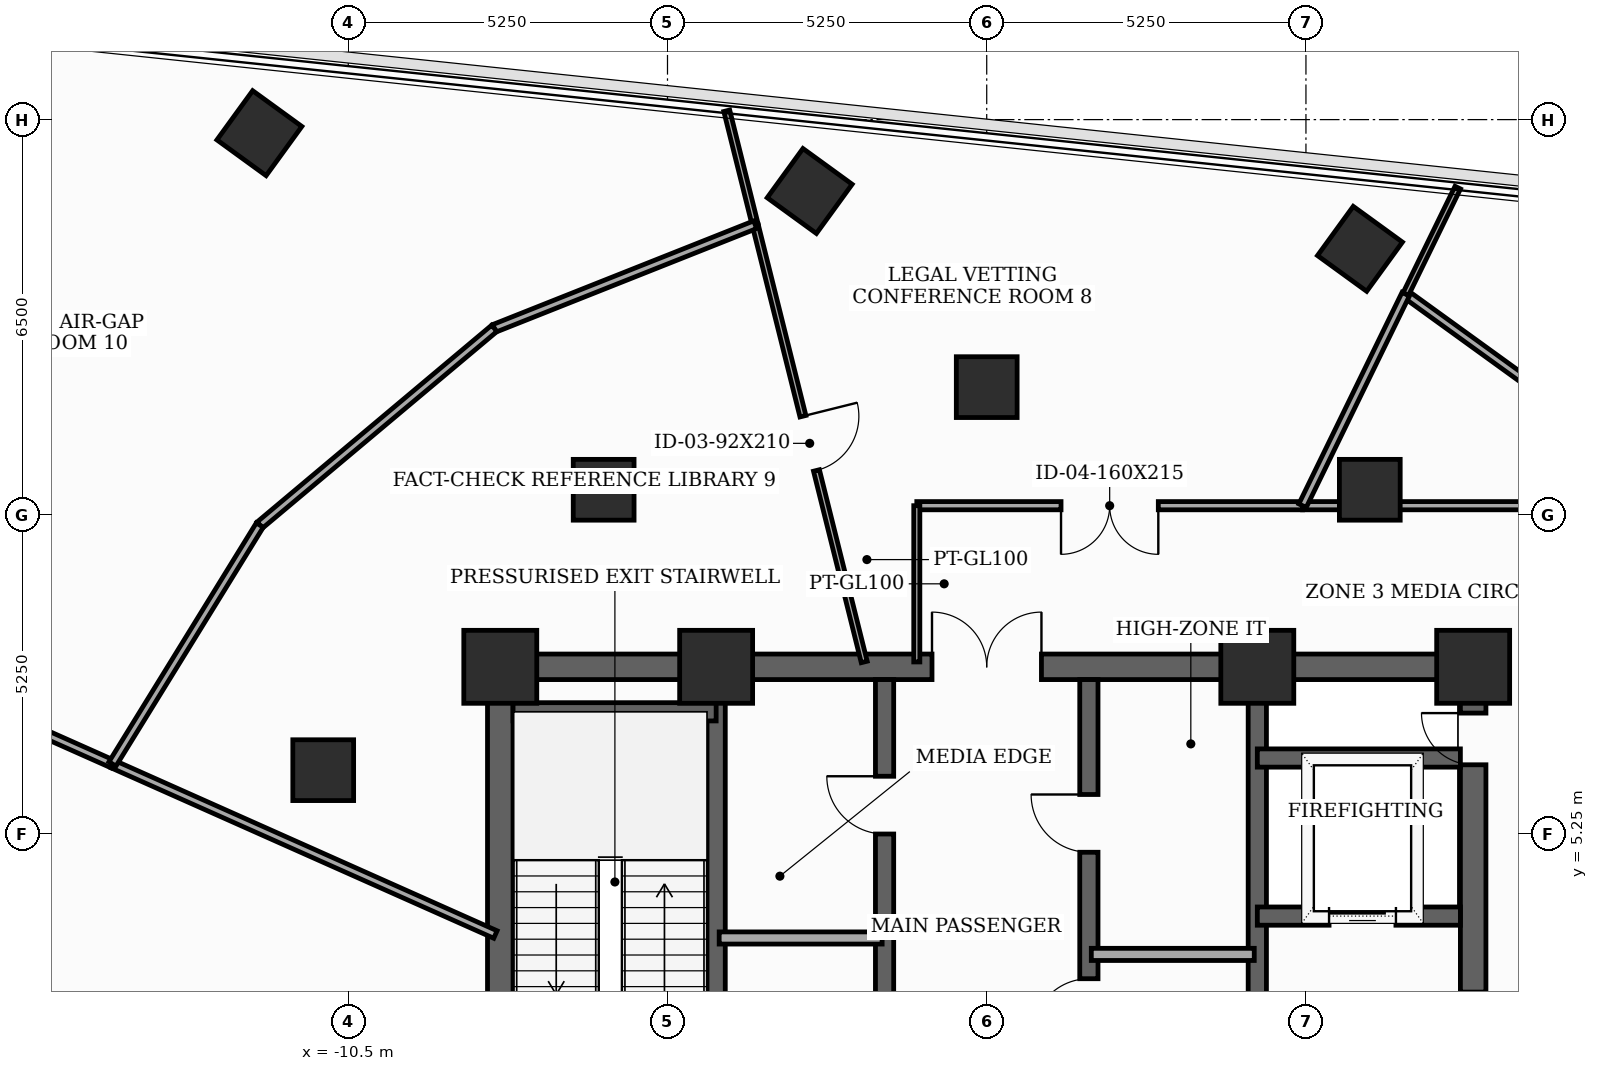
"""IFC4 building model, lengths in metres.
Left out: names, types, materials, properties, quantities, classifications, styles, units other than length and angle.
Written with IfcOpenShell. Run it as: python <this file> out.ifc"""

import sys

from ifc_helpers import new_model, si_unit, direction, frame, frame_2d, origin, origin_2d, place, context, subcontext, project, spatial, rectangle, extrude, element, fill, save


model = new_model("IFC4")
c1 = context("Model", 3, precision=1e-05, world=origin(), true_north=direction((0.0, 1.0)))
c2 = subcontext(c1, "Body", "Model", "MODEL_VIEW")
j1 = project(units=[si_unit("LENGTHUNIT", "METRE"), si_unit("PLANEANGLEUNIT", "RADIAN")], contexts=[c1])
p1 = place(None, origin())
s1 = spatial("IfcSite", under=j1, at=p1, CompositionType="ELEMENT")
p2 = place(p1, origin())
s2 = spatial("IfcBuilding", under=s1, at=p2, CompositionType="ELEMENT")
p3 = place(p2, frame((0.0, 0.0, 230.0)))
s3 = spatial("IfcBuildingStorey", under=s2, at=p3, CompositionType="ELEMENT", Elevation=230.0)
for number, where, z_axis, x_axis in (
    (1, (8.0, 8.0, 0.0), (0.0, 0.0, 1.0), (1.0, 0.0, 0.0)),
    (2, (4.45, 8.0, 0.0), (0.0, 0.0, 1.0), (1.0, 0.0, 0.0)),
    (3, (-4.45, 8.0, 0.0), (0.0, 0.0, 1.0), (1.0, 0.0, 0.0)),
    (4, (-8.0, 8.0, 0.0), (0.0, 0.0, 1.0), (1.0, 0.0, 0.0)),
):
    element("IfcColumn", number, at=place(p3, frame(where, z_axis=z_axis, x_axis=x_axis)), inside=s3, PredefinedType="COLUMN", context=c2, shape_type="SweptSolid", body=[
        extrude(rectangle(XDim=1.2, YDim=1.2, at=origin_2d()), origin(), (0.0, 0.0, 1.0), 3.7),
    ])
for number, where, z_axis, x_axis in (
    (5, (6.3, 10.912, 0.0), (0.0, 0.0, 1.0), (1.0, 0.0, 0.0)),
    (6, (0.0, 12.6, 0.0), (0.0, 0.0, 1.0), (1.0, 0.0, 0.0)),
    (7, (-6.3, 10.912, 0.0), (0.0, 0.0, 1.0), (1.0, 0.0, 0.0)),
    (8, (-10.912, 6.3, 0.0), (0.0, 0.0, 1.0), (1.0, 0.0, 0.0)),
    (9, (6.138, 14.875, 0.0), (0.0, 0.0, 1.0), (0.588, 0.809, 0.0)),
    (10, (-2.912, 15.826, 0.0), (0.0, 0.0, 1.0), (0.588, 0.809, 0.0)),
    (11, (-11.962, 16.777, 0.0), (0.0, 0.0, 1.0), (0.588, 0.809, 0.0)),
):
    element("IfcColumn", number, at=place(p3, frame(where, z_axis=z_axis, x_axis=x_axis)), inside=s3, PredefinedType="COLUMN", context=c2, shape_type="SweptSolid", body=[
        extrude(rectangle(XDim=1.0, YDim=1.0, at=origin_2d()), origin(), (0.0, 0.0, 1.0), 3.7),
    ])
p4 = place(p3, frame((-8.0, -8.0, 0.0), z_axis=(0.0, 0.0, 1.0), x_axis=(0.0, 1.0, 0.0)))
e12 = element("IfcWall", 12, at=p4, inside=s3, PredefinedType="SHEAR", context=c2, shape_type="SweptSolid", body=[
    extrude(rectangle(XDim=16.0, YDim=0.42, at=frame_2d((8.0, 0.0))), origin(), (0.0, 0.0, 1.0), 3.5),
])
p5 = place(p4, frame((0.761, 0.0, 0.0)))
e13 = element("IfcOpeningElement", 13, at=p5, cuts=e12, PredefinedType="OPENING", context=c2, shape_type="SweptSolid", body=[
    extrude(rectangle(XDim=0.85, YDim=2.02, at=frame_2d((0.425, 1.01))), frame((0.0, 0.22, 0.0), z_axis=(0.0, -1.0, 0.0), x_axis=(1.0, 0.0, 0.0)), (0.0, 0.0, 1.0), 0.44),
])
p6 = place(p4, frame((5.35, 0.0, 0.0)))
e14 = element("IfcOpeningElement", 14, at=p6, cuts=e12, PredefinedType="OPENING", context=c2, shape_type="SweptSolid", body=[
    extrude(rectangle(XDim=1.05, YDim=2.15, at=frame_2d((0.525, 1.075))), frame((0.0, 0.22, 0.0), z_axis=(0.0, -1.0, 0.0), x_axis=(1.0, 0.0, 0.0)), (0.0, 0.0, 1.0), 0.44),
])
p7 = place(p3, frame((8.0, -8.0, 0.0), z_axis=(0.0, 0.0, 1.0), x_axis=(0.0, 1.0, 0.0)))
e15 = element("IfcWall", 15, at=p7, inside=s3, PredefinedType="SHEAR", context=c2, shape_type="SweptSolid", body=[
    extrude(rectangle(XDim=16.0, YDim=0.42, at=frame_2d((8.0, 0.0))), origin(), (0.0, 0.0, 1.0), 3.5),
])
p8 = place(p7, frame((9.6, 0.0, 0.0)))
e16 = element("IfcOpeningElement", 16, at=p8, cuts=e15, PredefinedType="OPENING", context=c2, shape_type="SweptSolid", body=[
    extrude(rectangle(XDim=1.05, YDim=2.15, at=frame_2d((0.525, 1.075))), frame((0.0, 0.22, 0.0), z_axis=(0.0, -1.0, 0.0), x_axis=(1.0, 0.0, 0.0)), (0.0, 0.0, 1.0), 0.44),
])
p9 = place(p7, frame((14.389, 0.0, 0.0)))
e17 = element("IfcOpeningElement", 17, at=p9, cuts=e15, PredefinedType="OPENING", context=c2, shape_type="SweptSolid", body=[
    extrude(rectangle(XDim=0.85, YDim=2.02, at=frame_2d((0.425, 1.01))), frame((0.0, 0.22, 0.0), z_axis=(0.0, -1.0, 0.0), x_axis=(1.0, 0.0, 0.0)), (0.0, 0.0, 1.0), 0.44),
])
p10 = place(p3, frame((-8.0, 8.0, 0.0), z_axis=(0.0, 0.0, 1.0), x_axis=(1.0, 0.0, 0.0)))
e18 = element("IfcWall", 18, at=p10, inside=s3, PredefinedType="SHEAR", context=c2, shape_type="SweptSolid", body=[
    extrude(rectangle(XDim=16.0, YDim=0.42, at=frame_2d((8.0, 0.0))), origin(), (0.0, 0.0, 1.0), 3.5),
])
p11 = place(p10, frame((7.1, 0.0, 0.0)))
e19 = element("IfcOpeningElement", 19, at=p11, cuts=e18, PredefinedType="OPENING", context=c2, shape_type="SweptSolid", body=[
    extrude(rectangle(XDim=1.8, YDim=2.15, at=frame_2d((0.9, 1.075))), frame((0.0, 0.22, 0.0), z_axis=(0.0, -1.0, 0.0), x_axis=(1.0, 0.0, 0.0)), (0.0, 0.0, 1.0), 0.44),
])
for number, where, z_axis, x_axis in (
    (20, (-4.45, -7.79, 0.0), (0.0, 0.0, 1.0), (0.0, 1.0, 0.0)),
    (21, (4.45, -7.79, 0.0), (0.0, 0.0, 1.0), (0.0, 1.0, 0.0)),
):
    element("IfcWall", number, at=place(p3, frame(where, z_axis=z_axis, x_axis=x_axis)), inside=s3, PredefinedType="SHEAR", context=c2, shape_type="SweptSolid", body=[
        extrude(rectangle(XDim=15.58, YDim=0.3, at=frame_2d((7.79, 0.0))), origin(), (0.0, 0.0, 1.0), 3.5),
    ])
p12 = place(p3, frame((-7.79, 7.26, 0.0), z_axis=(0.0, 0.0, 1.0), x_axis=(1.0, 0.0, 0.0)))
e22 = element("IfcWall", 22, at=p12, inside=s3, PredefinedType="SHEAR", context=c2, shape_type="SweptSolid", body=[
    extrude(rectangle(XDim=3.34, YDim=0.3, at=frame_2d((1.67, 0.0))), origin(), (0.0, 0.0, 1.0), 3.5),
])
p13 = place(p3, frame((4.45, 3.9, 0.0), z_axis=(0.0, 0.0, 1.0), x_axis=(1.0, 0.0, 0.0)))
e23 = element("IfcWall", 23, at=p13, inside=s3, PredefinedType="SHEAR", context=c2, shape_type="SweptSolid", body=[
    extrude(rectangle(XDim=3.34, YDim=0.3, at=frame_2d((1.67, 0.0))), origin(), (0.0, 0.0, 1.0), 3.5),
])
p14 = place(p13, frame((1.18, 0.0, 0.0)))
e24 = element("IfcOpeningElement", 24, at=p14, cuts=e23, PredefinedType="OPENING", context=c2, shape_type="SweptSolid", body=[
    extrude(rectangle(XDim=1.1, YDim=2.1, at=frame_2d((0.55, 1.05))), frame((0.0, 0.16, 0.0), z_axis=(0.0, -1.0, 0.0), x_axis=(1.0, 0.0, 0.0)), (0.0, 0.0, 1.0), 0.32),
])
p15 = place(p3, frame((4.45, 6.5, 0.0), z_axis=(0.0, 0.0, 1.0), x_axis=(1.0, 0.0, 0.0)))
e25 = element("IfcWall", 25, at=p15, inside=s3, PredefinedType="SHEAR", context=c2, shape_type="SweptSolid", body=[
    extrude(rectangle(XDim=3.34, YDim=0.3, at=frame_2d((1.67, 0.0))), origin(), (0.0, 0.0, 1.0), 3.5),
])
p16 = place(p3, frame((-1.68, -4.85, 0.0), z_axis=(0.0, 0.0, 1.0), x_axis=(0.0, 1.0, 0.0)))
e26 = element("IfcWall", 26, at=p16, inside=s3, PredefinedType="SHEAR", context=c2, shape_type="SweptSolid", body=[
    extrude(rectangle(XDim=12.64, YDim=0.3, at=frame_2d((6.32, 0.0))), origin(), (0.0, 0.0, 1.0), 3.5),
])
p17 = place(p16, frame((1.65, 0.0, 0.0)))
e27 = element("IfcOpeningElement", 27, at=p17, cuts=e26, PredefinedType="OPENING", context=c2, shape_type="SweptSolid", body=[
    extrude(rectangle(XDim=0.95, YDim=2.1, at=frame_2d((0.475, 1.05))), frame((0.0, 0.16, 0.0), z_axis=(0.0, -1.0, 0.0), x_axis=(1.0, 0.0, 0.0)), (0.0, 0.0, 1.0), 0.32),
])
p18 = place(p16, frame((5.9, 0.0, 0.0)))
e28 = element("IfcOpeningElement", 28, at=p18, cuts=e26, PredefinedType="OPENING", context=c2, shape_type="SweptSolid", body=[
    extrude(rectangle(XDim=0.95, YDim=2.1, at=frame_2d((0.475, 1.05))), frame((0.0, 0.16, 0.0), z_axis=(0.0, -1.0, 0.0), x_axis=(1.0, 0.0, 0.0)), (0.0, 0.0, 1.0), 0.32),
])
p19 = place(p16, frame((10.1, 0.0, 0.0)))
e29 = element("IfcOpeningElement", 29, at=p19, cuts=e26, PredefinedType="OPENING", context=c2, shape_type="SweptSolid", body=[
    extrude(rectangle(XDim=0.95, YDim=2.1, at=frame_2d((0.475, 1.05))), frame((0.0, 0.16, 0.0), z_axis=(0.0, -1.0, 0.0), x_axis=(1.0, 0.0, 0.0)), (0.0, 0.0, 1.0), 0.32),
])
p20 = place(p3, frame((1.68, -4.85, 0.0), z_axis=(0.0, 0.0, 1.0), x_axis=(0.0, 1.0, 0.0)))
e30 = element("IfcWall", 30, at=p20, inside=s3, PredefinedType="SHEAR", context=c2, shape_type="SweptSolid", body=[
    extrude(rectangle(XDim=12.64, YDim=0.3, at=frame_2d((6.32, 0.0))), origin(), (0.0, 0.0, 1.0), 3.5),
])
p21 = place(p20, frame((0.55, 0.0, 0.0)))
e31 = element("IfcOpeningElement", 31, at=p21, cuts=e30, PredefinedType="OPENING", context=c2, shape_type="SweptSolid", body=[
    extrude(rectangle(XDim=1.1, YDim=2.1, at=frame_2d((0.55, 1.05))), frame((0.0, 0.16, 0.0), z_axis=(0.0, -1.0, 0.0), x_axis=(1.0, 0.0, 0.0)), (0.0, 0.0, 1.0), 0.32),
])
p22 = place(p20, frame((2.65, 0.0, 0.0)))
e32 = element("IfcOpeningElement", 32, at=p22, cuts=e30, PredefinedType="OPENING", context=c2, shape_type="SweptSolid", body=[
    extrude(rectangle(XDim=1.1, YDim=2.1, at=frame_2d((0.55, 1.05))), frame((0.0, 0.16, 0.0), z_axis=(0.0, -1.0, 0.0), x_axis=(1.0, 0.0, 0.0)), (0.0, 0.0, 1.0), 0.32),
])
p23 = place(p20, frame((4.75, 0.0, 0.0)))
e33 = element("IfcOpeningElement", 33, at=p23, cuts=e30, PredefinedType="OPENING", context=c2, shape_type="SweptSolid", body=[
    extrude(rectangle(XDim=1.1, YDim=2.1, at=frame_2d((0.55, 1.05))), frame((0.0, 0.16, 0.0), z_axis=(0.0, -1.0, 0.0), x_axis=(1.0, 0.0, 0.0)), (0.0, 0.0, 1.0), 0.32),
])
p24 = place(p20, frame((6.8, 0.0, 0.0)))
e34 = element("IfcOpeningElement", 34, at=p24, cuts=e30, PredefinedType="OPENING", context=c2, shape_type="SweptSolid", body=[
    extrude(rectangle(XDim=0.92, YDim=2.1, at=frame_2d((0.46, 1.05))), frame((0.0, 0.16, 0.0), z_axis=(0.0, -1.0, 0.0), x_axis=(1.0, 0.0, 0.0)), (0.0, 0.0, 1.0), 0.32),
])
p25 = place(p20, frame((9.8, 0.0, 0.0)))
e35 = element("IfcOpeningElement", 35, at=p25, cuts=e30, PredefinedType="OPENING", context=c2, shape_type="SweptSolid", body=[
    extrude(rectangle(XDim=0.95, YDim=2.1, at=frame_2d((0.475, 1.05))), frame((0.0, 0.16, 0.0), z_axis=(0.0, -1.0, 0.0), x_axis=(1.0, 0.0, 0.0)), (0.0, 0.0, 1.0), 0.32),
])
for number, where, z_axis, x_axis in (
    (36, (-4.4, 3.54, 0.0), (0.0, 0.0, 1.0), (1.0, 0.0, 0.0)),
    (37, (1.72, 3.27, 0.0), (0.0, 0.0, 1.0), (1.0, 0.0, 0.0)),
):
    element("IfcWall", number, at=place(p3, frame(where, z_axis=z_axis, x_axis=x_axis)), inside=s3, PredefinedType="SOLIDWALL", context=c2, shape_type="SweptSolid", body=[
        extrude(rectangle(XDim=2.68, YDim=0.2, at=frame_2d((1.34, 0.0))), origin(), (0.0, 0.0, 1.0), 3.5),
    ])
p26 = place(p3, frame((10.15, 10.65, 0.0), z_axis=(0.0, 0.0, 1.0), x_axis=(-1.0, 0.0, 0.0)))
e38 = element("IfcWall", 38, at=p26, inside=s3, PredefinedType="PARTITIONING", context=c2, shape_type="SweptSolid", body=[
    extrude(rectangle(XDim=4.956, YDim=0.135, at=frame_2d((2.478, 0.0))), origin(), (0.0, 0.0, 1.0), 2.885),
])
p27 = place(p3, frame((5.194, 10.65, 0.0), z_axis=(0.0, 0.0, 1.0), x_axis=(-1.0, 0.0, 0.0)))
e39 = element("IfcWall", 39, at=p27, inside=s3, PredefinedType="PARTITIONING", context=c2, shape_type="SweptSolid", body=[
    extrude(rectangle(XDim=6.344, YDim=0.135, at=frame_2d((3.172, 0.0))), origin(), (0.0, 0.0, 1.0), 2.885),
])
p28 = place(p27, frame((2.372, 0.0, 0.0)))
e40 = element("IfcOpeningElement", 40, at=p28, cuts=e39, PredefinedType="OPENING", context=c2, shape_type="SweptSolid", body=[
    extrude(rectangle(XDim=1.6, YDim=2.15, at=frame_2d((0.8, 1.075))), frame((0.0, 0.077, 0.0), z_axis=(0.0, -1.0, 0.0), x_axis=(1.0, 0.0, 0.0)), (0.0, 0.0, 1.0), 0.155),
])
p29 = place(p3, frame((-1.15, 10.65, 0.0), z_axis=(0.0, 0.0, 1.0), x_axis=(0.0, -1.0, 0.0)))
e41 = element("IfcWall", 41, at=p29, inside=s3, PredefinedType="MOVABLE", context=c2, shape_type="SweptSolid", body=[
    extrude(rectangle(XDim=2.57, YDim=0.1, at=frame_2d((1.285, 0.0))), origin(), (0.0, 0.0, 1.0), 2.885),
])
p30 = place(p3, frame((-8.08, 3.597, 0.0), z_axis=(0.0, 0.0, 1.0), x_axis=(-0.913494385598, 0.40685133339, 0.0)))
e42 = element("IfcWall", 42, at=p30, inside=s3, PredefinedType="PARTITIONING", context=c2, shape_type="SweptSolid", body=[
    extrude(rectangle(XDim=6.894, YDim=0.135, at=frame_2d((3.447, 0.0))), origin(), (0.0, 0.0, 1.0), 2.885),
])
p31 = place(p3, frame((-14.378, 6.402, 0.0), z_axis=(0.0, 0.0, 1.0), x_axis=(-0.913562917951, 0.406697424315, 0.0)))
e43 = element("IfcWall", 43, at=p31, inside=s3, PredefinedType="PARTITIONING", context=c2, shape_type="SweptSolid", body=[
    extrude(rectangle(XDim=9.077, YDim=0.135, at=frame_2d((4.538, 0.0))), origin(), (0.0, 0.0, 1.0), 2.985),
])
p32 = place(p31, frame((4.078, 0.0, 0.0)))
e44 = element("IfcOpeningElement", 44, at=p32, cuts=e43, PredefinedType="OPENING", context=c2, shape_type="SweptSolid", body=[
    extrude(rectangle(XDim=0.92, YDim=2.1, at=frame_2d((0.46, 1.05))), frame((0.0, 0.077, 0.0), z_axis=(0.0, -1.0, 0.0), x_axis=(1.0, 0.0, 0.0)), (0.0, 0.0, 1.0), 0.155),
])
p33 = place(p3, frame((11.602, 10.725, 0.0), z_axis=(0.0, 0.0, 1.0), x_axis=(-0.810322435649, 0.58598425771, 0.0)))
e45 = element("IfcWall", 45, at=p33, inside=s3, PredefinedType="PARTITIONING", context=c2, shape_type="SweptSolid", body=[
    extrude(rectangle(XDim=5.812, YDim=0.135, at=frame_2d((2.906, 0.0))), origin(), (0.0, 0.0, 1.0), 3.5),
])
p34 = place(p3, frame((6.892, 14.131, 0.0), z_axis=(0.0, 0.0, 1.0), x_axis=(-0.438392584888, -0.898783589923, 0.0)))
e46 = element("IfcWall", 46, at=p34, inside=s3, PredefinedType="PARTITIONING", context=c2, shape_type="SweptSolid", body=[
    extrude(rectangle(XDim=3.873, YDim=0.135, at=frame_2d((1.937, 0.0))), origin(), (0.0, 0.0, 1.0), 2.885),
])
p35 = place(p3, frame((7.747, 15.882, 0.0), z_axis=(0.0, 0.0, 1.0), x_axis=(-0.438571753549, -0.898696176129, 0.0)))
e47 = element("IfcWall", 47, at=p35, inside=s3, PredefinedType="MOVABLE", context=c2, shape_type="SweptSolid", body=[
    extrude(rectangle(XDim=1.948, YDim=0.1, at=frame_2d((0.974, 0.0))), origin(), (0.0, 0.0, 1.0), 3.035),
])
p36 = place(p3, frame((-3.808, 15.271, 0.0), z_axis=(0.0, 0.0, 1.0), x_axis=(0.241993010569, -0.970277992555, 0.0)))
e48 = element("IfcWall", 48, at=p36, inside=s3, PredefinedType="MOVABLE", context=c2, shape_type="SweptSolid", body=[
    extrude(rectangle(XDim=7.411, YDim=0.1, at=frame_2d((3.706, 0.0))), origin(), (0.0, 0.0, 1.0), 2.885),
])
p37 = place(p36, frame((3.246, 0.0, 0.0)))
e49 = element("IfcOpeningElement", 49, at=p37, cuts=e48, PredefinedType="OPENING", context=c2, shape_type="SweptSolid", body=[
    extrude(rectangle(XDim=0.92, YDim=2.1, at=frame_2d((0.46, 1.05))), frame((0.0, 0.06, 0.0), z_axis=(0.0, -1.0, 0.0), x_axis=(1.0, 0.0, 0.0)), (0.0, 0.0, 1.0), 0.12),
])
p38 = place(p3, frame((-4.275, 17.146, 0.0), z_axis=(0.0, 0.0, 1.0), x_axis=(0.241881394388, -0.970305823464, 0.0)))
e50 = element("IfcWall", 50, at=p38, inside=s3, PredefinedType="MOVABLE", context=c2, shape_type="SweptSolid", body=[
    extrude(rectangle(XDim=1.932, YDim=0.1, at=frame_2d((0.966, 0.0))), origin(), (0.0, 0.0, 1.0), 3.035),
])
p39 = place(p3, frame((-3.808, 15.271, 0.0), z_axis=(0.0, 0.0, 1.0), x_axis=(-0.929356809345, -0.369182774414, 0.0)))
e51 = element("IfcWall", 51, at=p39, inside=s3, PredefinedType="PARTITIONING", context=c2, shape_type="SweptSolid", body=[
    extrude(rectangle(XDim=4.616, YDim=0.135, at=frame_2d((2.308, 0.0))), origin(), (0.0, 0.0, 1.0), 3.5),
])
p40 = place(p3, frame((-8.098, 13.567, 0.0), z_axis=(0.0, 0.0, 1.0), x_axis=(-0.766114520239, -0.642704085781, 0.0)))
e52 = element("IfcWall", 52, at=p40, inside=s3, PredefinedType="PARTITIONING", context=c2, shape_type="SweptSolid", body=[
    extrude(rectangle(XDim=5.035, YDim=0.135, at=frame_2d((2.517, 0.0))), origin(), (0.0, 0.0, 1.0), 2.985),
])
p41 = place(p3, frame((-11.955, 10.331, 0.0), z_axis=(0.0, 0.0, 1.0), x_axis=(-0.524888064347, -0.851171263557, 0.0)))
e53 = element("IfcWall", 53, at=p41, inside=s3, PredefinedType="PARTITIONING", context=c2, shape_type="SweptSolid", body=[
    extrude(rectangle(XDim=4.616, YDim=0.135, at=frame_2d((2.308, 0.0))), origin(), (0.0, 0.0, 1.0), 2.985),
])
p42 = place(p9, origin())
e54 = element("IfcDoor", 54, at=p42, inside=s3, OperationType="SINGLE_SWING_RIGHT", PredefinedType="TRAPDOOR", context=c2, shape_type="SweptSolid", body=[
    extrude(rectangle(XDim=0.85, YDim=2.02, at=frame_2d((0.425, 1.01))), frame((0.0, 0.025, 0.0), z_axis=(0.0, -1.0, 0.0), x_axis=(1.0, 0.0, 0.0)), (0.0, 0.0, 1.0), 0.05),
])
fill(e17, e54)
p43 = place(p11, origin())
e55 = element("IfcDoor", 55, at=p43, inside=s3, OperationType="DOUBLE_DOOR_SINGLE_SWING", PredefinedType="DOOR", context=c2, shape_type="SweptSolid", body=[
    extrude(rectangle(XDim=1.8, YDim=2.15, at=frame_2d((0.9, 1.075))), frame((0.0, 0.025, 0.0), z_axis=(0.0, -1.0, 0.0), x_axis=(1.0, 0.0, 0.0)), (0.0, 0.0, 1.0), 0.05),
])
fill(e19, e55)
p44 = place(p14, origin())
e56 = element("IfcDoor", 56, at=p44, inside=s3, OperationType="SLIDING_TO_LEFT", PredefinedType="DOOR", context=c2, shape_type="SweptSolid", body=[
    extrude(rectangle(XDim=1.1, YDim=2.1, at=frame_2d((0.55, 1.05))), frame((0.0, 0.025, 0.0), z_axis=(0.0, -1.0, 0.0), x_axis=(1.0, 0.0, 0.0)), (0.0, 0.0, 1.0), 0.05),
])
fill(e24, e56)
p45 = place(p19, origin())
e57 = element("IfcDoor", 57, at=p45, inside=s3, OperationType="SINGLE_SWING_RIGHT", PredefinedType="DOOR", context=c2, shape_type="SweptSolid", body=[
    extrude(rectangle(XDim=0.95, YDim=2.1, at=frame_2d((0.475, 1.05))), frame((0.0, 0.025, 0.0), z_axis=(0.0, -1.0, 0.0), x_axis=(1.0, 0.0, 0.0)), (0.0, 0.0, 1.0), 0.05),
])
fill(e29, e57)
p46 = place(p24, origin())
e58 = element("IfcDoor", 58, at=p46, inside=s3, OperationType="SINGLE_SWING_LEFT", PredefinedType="DOOR", context=c2, shape_type="SweptSolid", body=[
    extrude(rectangle(XDim=0.92, YDim=2.1, at=frame_2d((0.46, 1.05))), frame((0.0, 0.025, 0.0), z_axis=(0.0, -1.0, 0.0), x_axis=(1.0, 0.0, 0.0)), (0.0, 0.0, 1.0), 0.05),
])
fill(e34, e58)
p47 = place(p25, origin())
e59 = element("IfcDoor", 59, at=p47, inside=s3, OperationType="SINGLE_SWING_RIGHT", PredefinedType="DOOR", context=c2, shape_type="SweptSolid", body=[
    extrude(rectangle(XDim=0.95, YDim=2.1, at=frame_2d((0.475, 1.05))), frame((0.0, 0.025, 0.0), z_axis=(0.0, -1.0, 0.0), x_axis=(1.0, 0.0, 0.0)), (0.0, 0.0, 1.0), 0.05),
])
fill(e35, e59)
p48 = place(p28, origin())
e60 = element("IfcDoor", 60, at=p48, inside=s3, OperationType="DOUBLE_DOOR_SINGLE_SWING", PredefinedType="DOOR", context=c2, shape_type="SweptSolid", body=[
    extrude(rectangle(XDim=1.6, YDim=2.15, at=frame_2d((0.8, 1.075))), frame((0.0, 0.025, 0.0), z_axis=(0.0, -1.0, 0.0), x_axis=(1.0, 0.0, 0.0)), (0.0, 0.0, 1.0), 0.05),
])
fill(e40, e60)
p49 = place(p37, origin())
e61 = element("IfcDoor", 61, at=p49, inside=s3, OperationType="SINGLE_SWING_LEFT", PredefinedType="DOOR", context=c2, shape_type="SweptSolid", body=[
    extrude(rectangle(XDim=0.92, YDim=2.1, at=frame_2d((0.46, 1.05))), frame((0.0, 0.025, 0.0), z_axis=(0.0, -1.0, 0.0), x_axis=(1.0, 0.0, 0.0)), (0.0, 0.0, 1.0), 0.05),
])
fill(e49, e61)
save(model, sys.argv[1])
